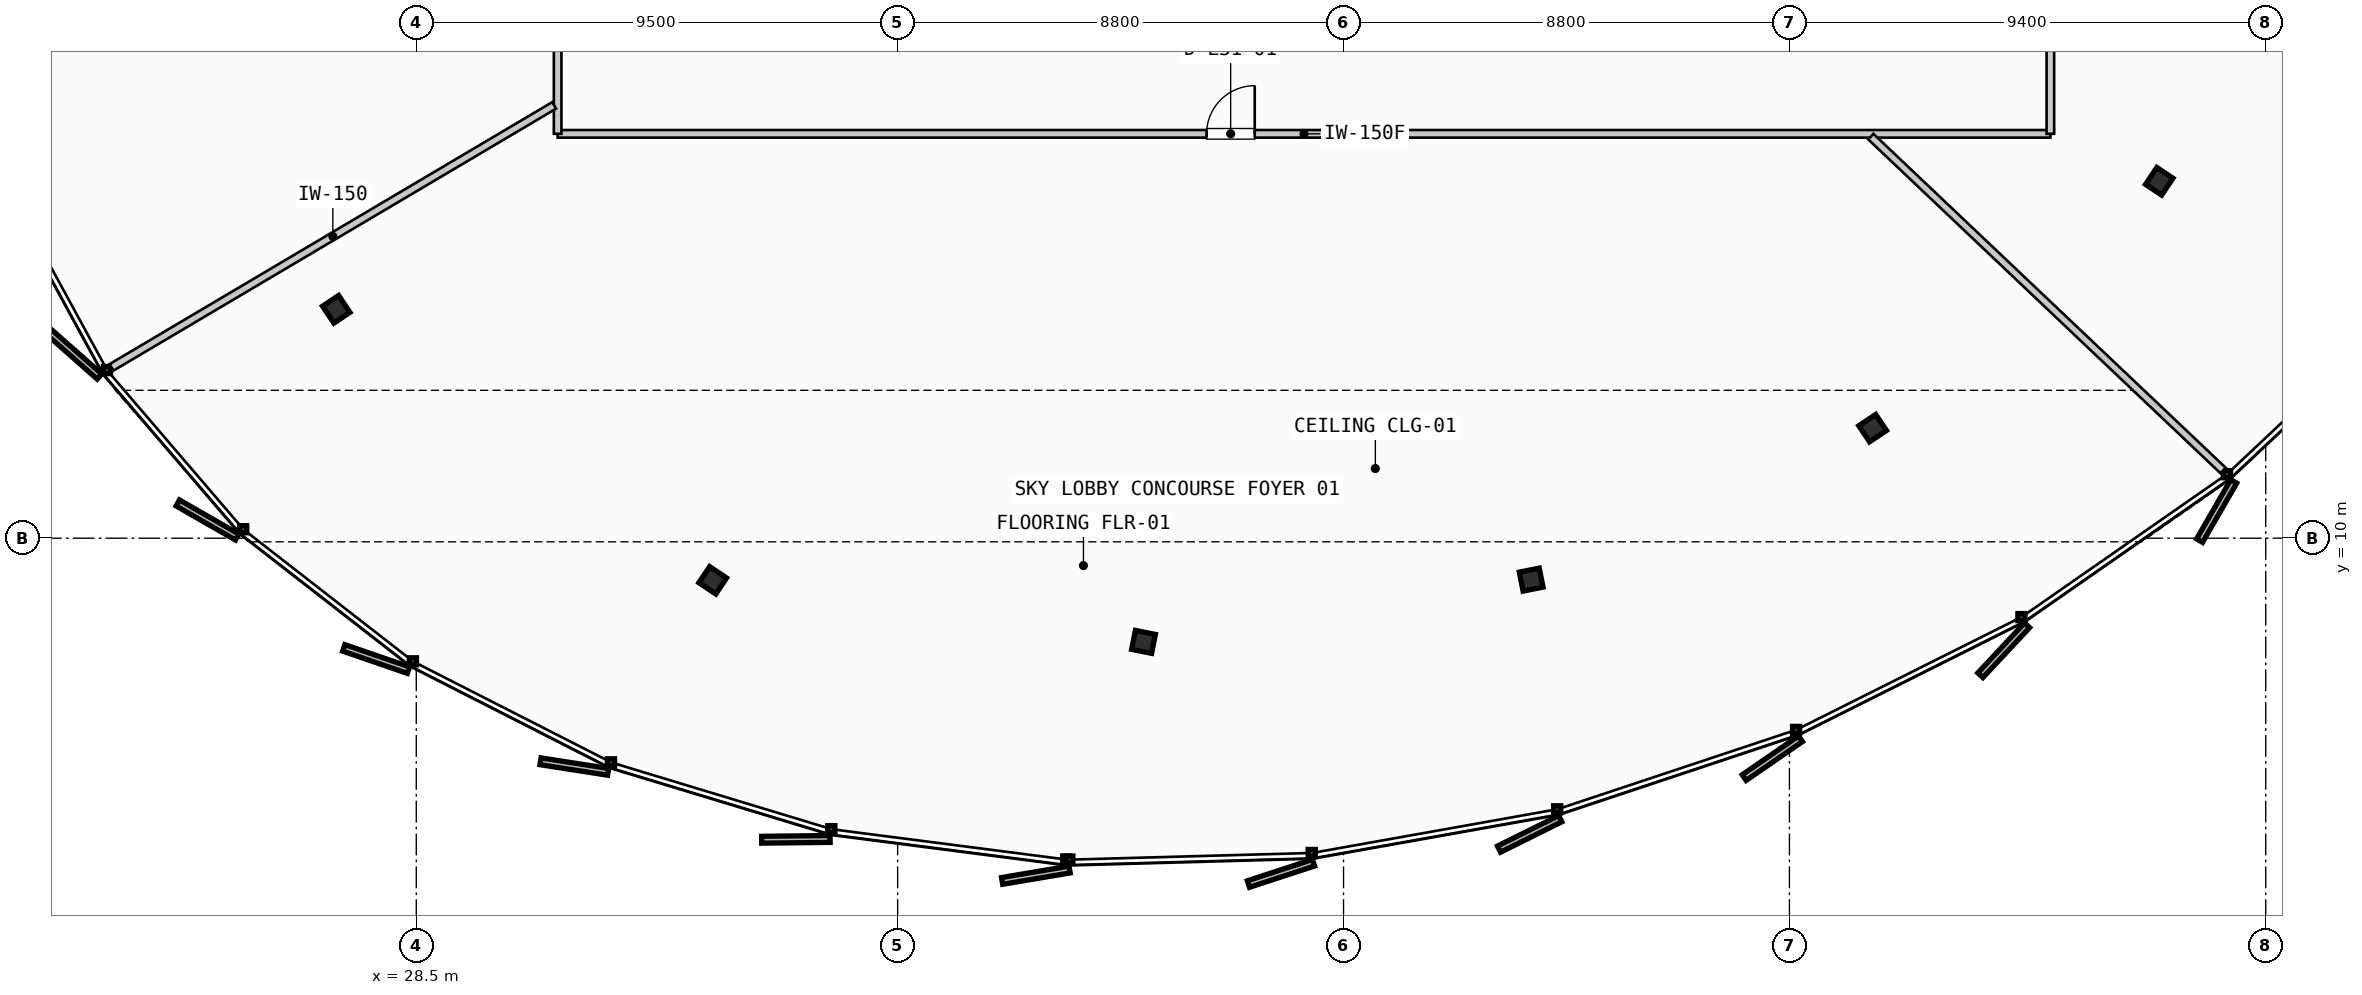
"""IFC4 building model, lengths in metres.
Left out: names, types, materials, properties, quantities, classifications, styles, units other than length and angle.
Written with IfcOpenShell. Run it as: python <this file> out.ifc"""

import sys

from ifc_helpers import new_model, si_unit, direction, frame, frame_2d, origin, origin_2d, place, context, subcontext, project, spatial, rectangle, i_section, extrude, source, transform, mapped, element, fill, save


model = new_model("IFC4")
c1 = context("Model", 3, precision=1e-05, world=origin(), true_north=direction((0.0, 1.0)))
c2 = subcontext(c1, "Body", "Model", "MODEL_VIEW")
j1 = project(units=[si_unit("LENGTHUNIT", "METRE"), si_unit("PLANEANGLEUNIT", "RADIAN")], contexts=[c1])
p1 = place(None, origin())
s1 = spatial("IfcSite", under=j1, at=p1, CompositionType="ELEMENT")
p2 = place(p1, origin())
s2 = spatial("IfcBuilding", under=s1, at=p2, CompositionType="ELEMENT")
p3 = place(p2, frame((0.0, 0.0, 125.2)))
s3 = spatial("IfcBuildingStorey", under=s2, at=p3, CompositionType="ELEMENT", Elevation=125.2)
m1 = source(origin(), c2, "Body", "SweptSolid", [
    extrude(i_section(OverallWidth=0.401, OverallDepth=0.381, WebThickness=0.032, FlangeThickness=0.051, FilletRadius=0.015, at=origin_2d()), origin(), (0.0, 0.0, 1.0), 3.35),
])
for number, where, z_axis, x_axis in (
    (1, (26.921, 14.517, 0.0), (0.0, 0.0, 1.0), (-0.831, -0.556, 0.0)),
    (2, (34.351, 9.168, 0.0), (0.0, 0.0, 1.0), (-0.556, -0.831, 0.0)),
    (3, (42.852, 7.954, 0.0), (0.0, 0.0, 1.0), (-0.195, -0.981, 0.0)),
    (4, (50.503, 9.182, 0.0), (0.0, 0.0, 1.0), (0.195, -0.981, 0.0)),
    (5, (57.242, 12.172, 0.0), (0.0, 0.0, 1.0), (0.556, -0.831, 0.0)),
    (6, (62.899, 17.043, 0.0), (0.0, 0.0, 1.0), (0.831, -0.556, 0.0)),
):
    element("IfcColumn", number, at=place(p3, frame(where, z_axis=z_axis, x_axis=x_axis)), inside=s3, PredefinedType="COLUMN", context=c2, shape_type="MappedRepresentation", body=[
        mapped(m1, transform((0.0, 0.0, 0.0), scale=1.0)),
    ])
p4 = place(p3, frame((31.29, 17.98, 0.0), z_axis=(0.0, 0.0, 1.0), x_axis=(1.0, 0.0, 0.0)))
e7 = element("IfcWall", 7, at=p4, inside=s3, PredefinedType="PARTITIONING", context=c2, shape_type="SweptSolid", body=[
    extrude(rectangle(XDim=29.46, YDim=0.15, at=frame_2d((14.73, 0.0))), origin(), (0.0, 0.0, 1.0), 2.635),
])
p5 = place(p4, frame((12.807, 0.0, 0.0)))
e8 = element("IfcOpeningElement", 8, at=p5, cuts=e7, PredefinedType="OPENING", context=c2, shape_type="SweptSolid", body=[
    extrude(rectangle(XDim=0.95, YDim=2.15, at=frame_2d((0.475, 1.075))), frame((0.0, 0.085, 0.0), z_axis=(0.0, -1.0, 0.0), x_axis=(1.0, 0.0, 0.0)), (0.0, 0.0, 1.0), 0.17),
])
p6 = place(p3, frame((60.75, 17.98, 0.0), z_axis=(0.0, 0.0, 1.0), x_axis=(0.0, 1.0, 0.0)))
e9 = element("IfcWall", 9, at=p6, inside=s3, PredefinedType="PARTITIONING", context=c2, shape_type="SweptSolid", body=[
    extrude(rectangle(XDim=20.06, YDim=0.15, at=frame_2d((10.03, 0.0))), origin(), (0.0, 0.0, 1.0), 2.635),
])
p7 = place(p6, frame((9.555, 0.0, 0.0)))
e10 = element("IfcOpeningElement", 10, at=p7, cuts=e9, PredefinedType="OPENING", context=c2, shape_type="SweptSolid", body=[
    extrude(rectangle(XDim=0.95, YDim=2.15, at=frame_2d((0.475, 1.075))), frame((0.0, 0.085, 0.0), z_axis=(0.0, -1.0, 0.0), x_axis=(1.0, 0.0, 0.0)), (0.0, 0.0, 1.0), 0.17),
])
p8 = place(p3, frame((31.29, 38.04, 0.0), z_axis=(0.0, 0.0, 1.0), x_axis=(0.0, -1.0, 0.0)))
e11 = element("IfcWall", 11, at=p8, inside=s3, PredefinedType="PARTITIONING", context=c2, shape_type="SweptSolid", body=[
    extrude(rectangle(XDim=20.06, YDim=0.15, at=frame_2d((10.03, 0.0))), origin(), (0.0, 0.0, 1.0), 2.635),
])
p9 = place(p8, frame((4.552, 0.0, 0.0)))
e12 = element("IfcOpeningElement", 12, at=p9, cuts=e11, PredefinedType="OPENING", context=c2, shape_type="SweptSolid", body=[
    extrude(rectangle(XDim=0.95, YDim=2.15, at=frame_2d((0.475, 1.075))), frame((0.0, 0.085, 0.0), z_axis=(0.0, -1.0, 0.0), x_axis=(1.0, 0.0, 0.0)), (0.0, 0.0, 1.0), 0.17),
])
p10 = place(p8, frame((14.002, 0.0, 0.0)))
e13 = element("IfcOpeningElement", 13, at=p10, cuts=e11, PredefinedType="OPENING", context=c2, shape_type="SweptSolid", body=[
    extrude(rectangle(XDim=0.95, YDim=2.15, at=frame_2d((0.475, 1.075))), frame((0.0, 0.085, 0.0), z_axis=(0.0, -1.0, 0.0), x_axis=(1.0, 0.0, 0.0)), (0.0, 0.0, 1.0), 0.17),
])
p11 = place(p3, frame((31.221, 18.541, 0.0), z_axis=(0.0, 0.0, 1.0), x_axis=(-0.860592603092, -0.509293993194, 0.0)))
e14 = element("IfcWall", 14, at=p11, inside=s3, PredefinedType="PARTITIONING", context=c2, shape_type="SweptSolid", body=[
    extrude(rectangle(XDim=10.151, YDim=0.15, at=frame_2d((5.075, 0.0))), origin(), (0.0, 0.0, 1.0), 2.635),
])
p12 = place(p3, frame((57.206, 17.925, 0.0), z_axis=(0.0, 0.0, 1.0), x_axis=(0.725826765277, -0.687877537653, 0.0)))
e15 = element("IfcWall", 15, at=p12, inside=s3, PredefinedType="PARTITIONING", context=c2, shape_type="SweptSolid", body=[
    extrude(rectangle(XDim=9.579, YDim=0.15, at=frame_2d((4.79, 0.0))), origin(), (0.0, 0.0, 1.0), 2.635),
])
m2 = source(origin(), c2, "Body", "SweptSolid", [
    extrude(rectangle(XDim=0.95, YDim=2.15, at=frame_2d((0.475, 1.075))), frame((0.0, 0.025, 0.0), z_axis=(0.0, -1.0, 0.0), x_axis=(1.0, 0.0, 0.0)), (0.0, 0.0, 1.0), 0.05),
])
p13 = place(p5, origin())
e16 = element("IfcDoor", 16, at=p13, inside=s3, OperationType="SINGLE_SWING_RIGHT", PredefinedType="DOOR", context=c2, shape_type="MappedRepresentation", body=[
    mapped(m2, transform((0.0, 0.0, 0.0), scale=1.0)),
])
fill(e8, e16)
save(model, sys.argv[1])
